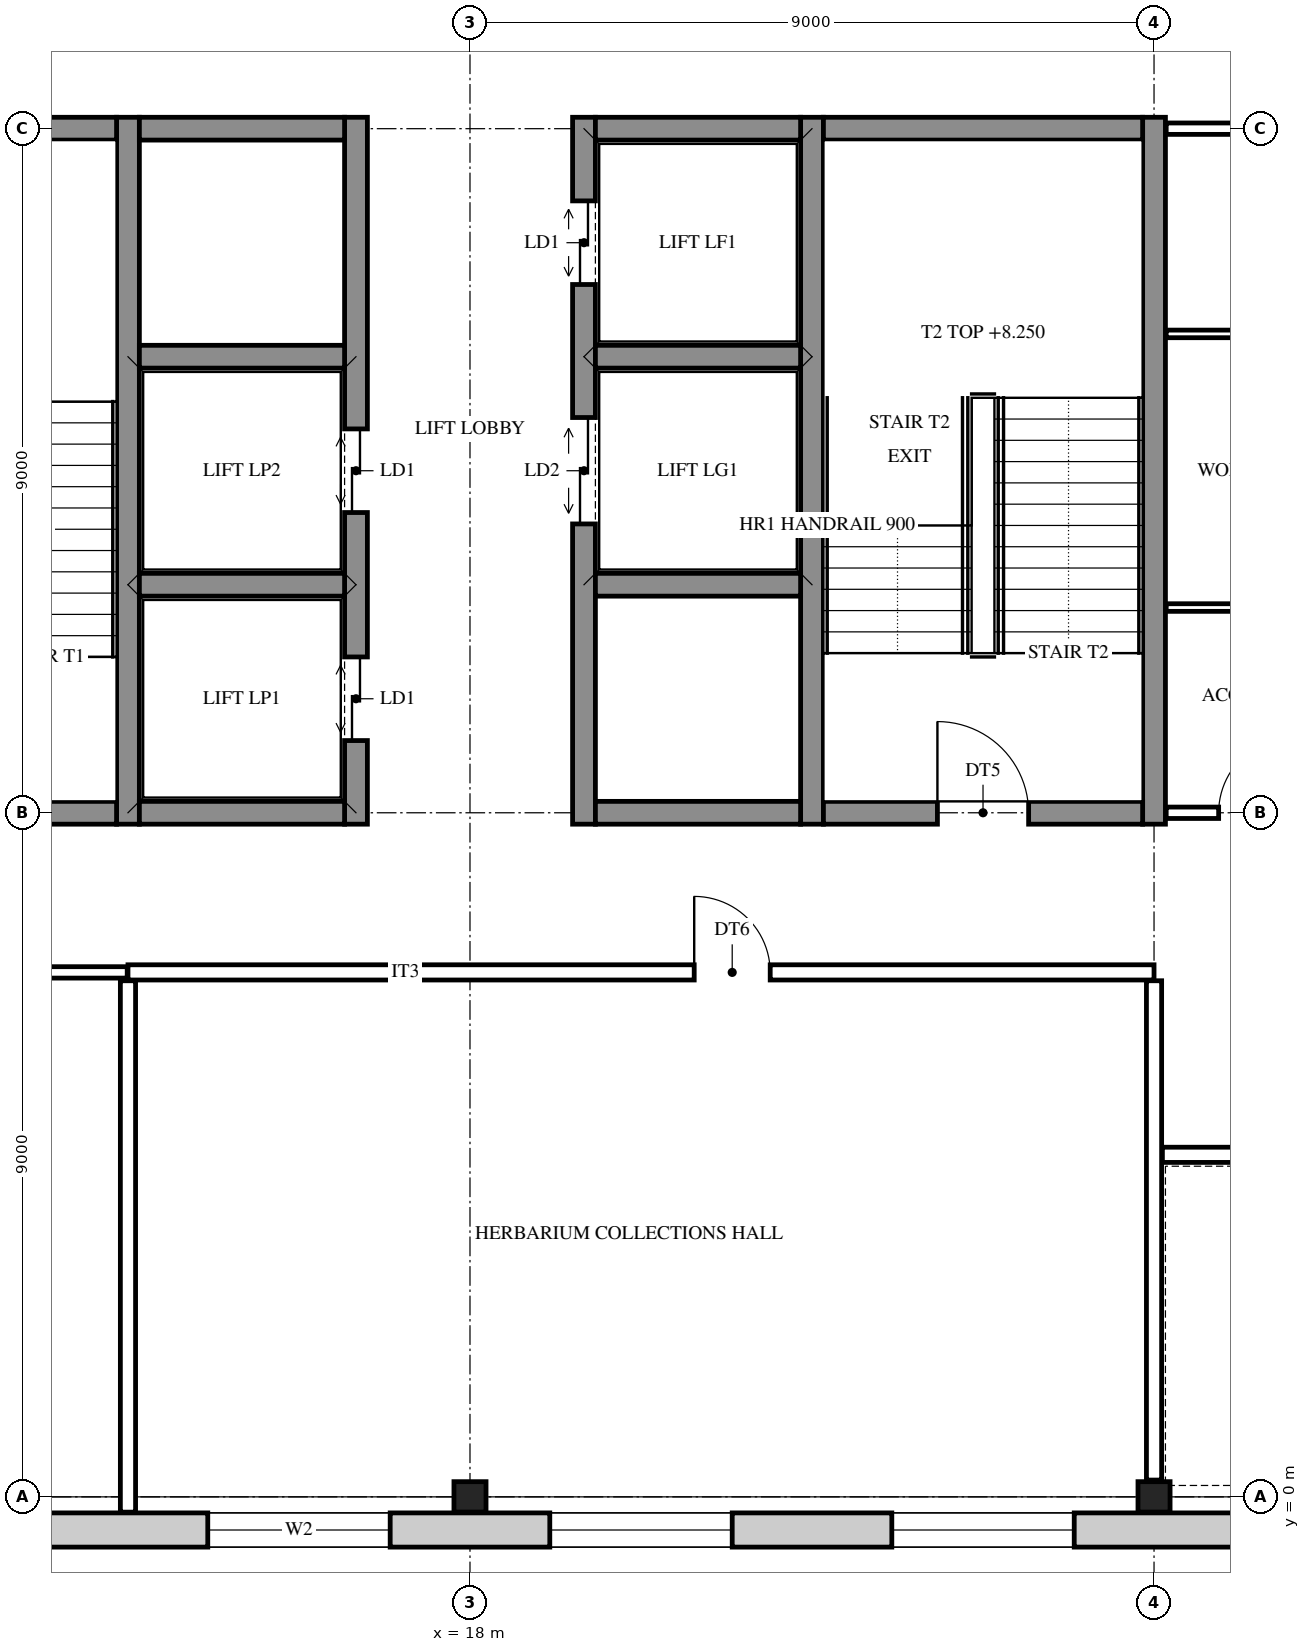
"""IFC4 building model, lengths in metres.
Left out: names, types, materials, properties, quantities, classifications, styles, units other than length and angle.
Written with IfcOpenShell. Run it as: python <this file> out.ifc"""

import sys

from ifc_helpers import new_model, si_unit, direction, frame, frame_2d, origin, origin_2d, place, context, subcontext, project, spatial, rectangle, i_section, extrude, element, fill, save


model = new_model("IFC4")
c1 = context("Model", 3, precision=1e-05, world=origin(), true_north=direction((0.0, 1.0)))
c2 = subcontext(c1, "Body", "Model", "MODEL_VIEW")
j1 = project(units=[si_unit("LENGTHUNIT", "METRE"), si_unit("PLANEANGLEUNIT", "RADIAN")], contexts=[c1])
p1 = place(None, origin())
s1 = spatial("IfcSite", under=j1, at=p1, CompositionType="ELEMENT")
p2 = place(p1, origin())
s2 = spatial("IfcBuilding", under=s1, at=p2, CompositionType="ELEMENT")
p3 = place(p2, frame((0.0, 0.0, 6.0)))
s3 = spatial("IfcBuildingStorey", under=s2, at=p3, CompositionType="ELEMENT", Elevation=6.0)
for number, where, z_axis, x_axis in (
    (1, (18.0, 0.0, 0.0), (0.0, 0.0, 1.0), (0.0, 1.0, 0.0)),
    (2, (27.0, 0.0, 0.0), (0.0, 0.0, 1.0), (0.0, 1.0, 0.0)),
):
    element("IfcColumn", number, at=place(p3, frame(where, z_axis=z_axis, x_axis=x_axis)), inside=s3, PredefinedType="COLUMN", context=c2, shape_type="SweptSolid", body=[
        extrude(i_section(OverallWidth=0.4, OverallDepth=0.422, WebThickness=0.028, FlangeThickness=0.036, at=origin_2d()), origin(), (0.0, 0.0, 1.0), 4.5),
    ])
p4 = place(p3, frame((13.5, 8.85, 0.0), z_axis=(0.0, 0.0, 1.0), x_axis=(0.0, 1.0, 0.0)))
e3 = element("IfcWall", 3, at=p4, inside=s3, PredefinedType="SHEAR", context=c2, shape_type="SweptSolid", body=[
    extrude(rectangle(XDim=9.3, YDim=0.3, at=frame_2d((4.65, 0.0))), origin(), (0.0, 0.0, 1.0), 4.5),
])
p5 = place(p3, frame((16.5, 8.85, 0.0), z_axis=(0.0, 0.0, 1.0), x_axis=(0.0, 1.0, 0.0)))
e4 = element("IfcWall", 4, at=p5, inside=s3, PredefinedType="SHEAR", context=c2, shape_type="SweptSolid", body=[
    extrude(rectangle(XDim=9.3, YDim=0.3, at=frame_2d((4.65, 0.0))), origin(), (0.0, 0.0, 1.0), 4.5),
])
p6 = place(p5, frame((1.1, 0.0, 0.0)))
e5 = element("IfcOpeningElement", 5, at=p6, cuts=e4, PredefinedType="OPENING", context=c2, shape_type="SweptSolid", body=[
    extrude(rectangle(XDim=1.1, YDim=2.1, at=frame_2d((0.55, 1.05))), frame((0.0, 0.16, 0.0), z_axis=(0.0, -1.0, 0.0), x_axis=(1.0, 0.0, 0.0)), (0.0, 0.0, 1.0), 0.32),
])
p7 = place(p5, frame((4.1, 0.0, 0.0)))
e6 = element("IfcOpeningElement", 6, at=p7, cuts=e4, PredefinedType="OPENING", context=c2, shape_type="SweptSolid", body=[
    extrude(rectangle(XDim=1.1, YDim=2.1, at=frame_2d((0.55, 1.05))), frame((0.0, 0.16, 0.0), z_axis=(0.0, -1.0, 0.0), x_axis=(1.0, 0.0, 0.0)), (0.0, 0.0, 1.0), 0.32),
])
p8 = place(p3, frame((19.5, 8.85, 0.0), z_axis=(0.0, 0.0, 1.0), x_axis=(0.0, 1.0, 0.0)))
e7 = element("IfcWall", 7, at=p8, inside=s3, PredefinedType="SHEAR", context=c2, shape_type="SweptSolid", body=[
    extrude(rectangle(XDim=9.3, YDim=0.3, at=frame_2d((4.65, 0.0))), origin(), (0.0, 0.0, 1.0), 4.5),
])
p9 = place(p8, frame((3.95, 0.0, 0.0)))
e8 = element("IfcOpeningElement", 8, at=p9, cuts=e7, PredefinedType="OPENING", context=c2, shape_type="SweptSolid", body=[
    extrude(rectangle(XDim=1.4, YDim=2.1, at=frame_2d((0.7, 1.05))), frame((0.0, 0.16, 0.0), z_axis=(0.0, -1.0, 0.0), x_axis=(1.0, 0.0, 0.0)), (0.0, 0.0, 1.0), 0.32),
])
p10 = place(p8, frame((7.1, 0.0, 0.0)))
e9 = element("IfcOpeningElement", 9, at=p10, cuts=e7, PredefinedType="OPENING", context=c2, shape_type="SweptSolid", body=[
    extrude(rectangle(XDim=1.1, YDim=2.1, at=frame_2d((0.55, 1.05))), frame((0.0, 0.16, 0.0), z_axis=(0.0, -1.0, 0.0), x_axis=(1.0, 0.0, 0.0)), (0.0, 0.0, 1.0), 0.32),
])
for number, where, z_axis, x_axis in (
    (10, (22.5, 8.85, 0.0), (0.0, 0.0, 1.0), (0.0, 1.0, 0.0)),
    (11, (27.0, 8.85, 0.0), (0.0, 0.0, 1.0), (0.0, 1.0, 0.0)),
):
    element("IfcWall", number, at=place(p3, frame(where, z_axis=z_axis, x_axis=x_axis)), inside=s3, PredefinedType="SHEAR", context=c2, shape_type="SweptSolid", body=[
        extrude(rectangle(XDim=9.3, YDim=0.3, at=frame_2d((4.65, 0.0))), origin(), (0.0, 0.0, 1.0), 4.5),
    ])
p11 = place(p3, frame((9.15, 9.0, 0.0), z_axis=(0.0, 0.0, 1.0), x_axis=(1.0, 0.0, 0.0)))
e12 = element("IfcWall", 12, at=p11, inside=s3, PredefinedType="SHEAR", context=c2, shape_type="SweptSolid", body=[
    extrude(rectangle(XDim=4.2, YDim=0.3, at=frame_2d((2.1, 0.0))), origin(), (0.0, 0.0, 1.0), 4.5),
])
p12 = place(p11, frame((1.5, 0.0, 0.0)))
e13 = element("IfcOpeningElement", 13, at=p12, cuts=e12, PredefinedType="OPENING", context=c2, shape_type="SweptSolid", body=[
    extrude(rectangle(XDim=1.2, YDim=2.1, at=frame_2d((0.6, 1.05))), frame((0.0, 0.16, 0.0), z_axis=(0.0, -1.0, 0.0), x_axis=(1.0, 0.0, 0.0)), (0.0, 0.0, 1.0), 0.32),
])
for number, where, z_axis, x_axis in (
    (14, (13.65, 9.0, 0.0), (0.0, 0.0, 1.0), (1.0, 0.0, 0.0)),
    (15, (19.65, 9.0, 0.0), (0.0, 0.0, 1.0), (1.0, 0.0, 0.0)),
):
    element("IfcWall", number, at=place(p3, frame(where, z_axis=z_axis, x_axis=x_axis)), inside=s3, PredefinedType="SHEAR", context=c2, shape_type="SweptSolid", body=[
        extrude(rectangle(XDim=2.7, YDim=0.3, at=frame_2d((1.35, 0.0))), origin(), (0.0, 0.0, 1.0), 4.5),
    ])
p13 = place(p3, frame((22.65, 9.0, 0.0), z_axis=(0.0, 0.0, 1.0), x_axis=(1.0, 0.0, 0.0)))
e16 = element("IfcWall", 16, at=p13, inside=s3, PredefinedType="SHEAR", context=c2, shape_type="SweptSolid", body=[
    extrude(rectangle(XDim=4.2, YDim=0.3, at=frame_2d((2.1, 0.0))), origin(), (0.0, 0.0, 1.0), 4.5),
])
p14 = place(p13, frame((1.5, 0.0, 0.0)))
e17 = element("IfcOpeningElement", 17, at=p14, cuts=e16, PredefinedType="OPENING", context=c2, shape_type="SweptSolid", body=[
    extrude(rectangle(XDim=1.2, YDim=2.1, at=frame_2d((0.6, 1.05))), frame((0.0, 0.16, 0.0), z_axis=(0.0, -1.0, 0.0), x_axis=(1.0, 0.0, 0.0)), (0.0, 0.0, 1.0), 0.32),
])
for number, where, z_axis, x_axis in (
    (18, (13.65, 12.0, 0.0), (0.0, 0.0, 1.0), (1.0, 0.0, 0.0)),
    (19, (19.65, 12.0, 0.0), (0.0, 0.0, 1.0), (1.0, 0.0, 0.0)),
    (20, (13.65, 15.0, 0.0), (0.0, 0.0, 1.0), (1.0, 0.0, 0.0)),
    (21, (19.65, 15.0, 0.0), (0.0, 0.0, 1.0), (1.0, 0.0, 0.0)),
):
    element("IfcWall", number, at=place(p3, frame(where, z_axis=z_axis, x_axis=x_axis)), inside=s3, PredefinedType="SHEAR", context=c2, shape_type="SweptSolid", body=[
        extrude(rectangle(XDim=2.7, YDim=0.3, at=frame_2d((1.35, 0.0))), origin(), (0.0, 0.0, 1.0), 4.5),
    ])
p15 = place(p3, frame((9.15, 18.0, 0.0), z_axis=(0.0, 0.0, 1.0), x_axis=(1.0, 0.0, 0.0)))
e22 = element("IfcWall", 22, at=p15, inside=s3, PredefinedType="SHEAR", context=c2, shape_type="SweptSolid", body=[
    extrude(rectangle(XDim=4.2, YDim=0.3, at=frame_2d((2.1, 0.0))), origin(), (0.0, 0.0, 1.0), 4.5),
])
for number, where, z_axis, x_axis in (
    (23, (13.65, 18.0, 0.0), (0.0, 0.0, 1.0), (1.0, 0.0, 0.0)),
    (24, (19.65, 18.0, 0.0), (0.0, 0.0, 1.0), (1.0, 0.0, 0.0)),
):
    element("IfcWall", number, at=place(p3, frame(where, z_axis=z_axis, x_axis=x_axis)), inside=s3, PredefinedType="SHEAR", context=c2, shape_type="SweptSolid", body=[
        extrude(rectangle(XDim=2.7, YDim=0.3, at=frame_2d((1.35, 0.0))), origin(), (0.0, 0.0, 1.0), 4.5),
    ])
p16 = place(p3, frame((22.65, 18.0, 0.0), z_axis=(0.0, 0.0, 1.0), x_axis=(1.0, 0.0, 0.0)))
e25 = element("IfcWall", 25, at=p16, inside=s3, PredefinedType="SHEAR", context=c2, shape_type="SweptSolid", body=[
    extrude(rectangle(XDim=4.2, YDim=0.3, at=frame_2d((2.1, 0.0))), origin(), (0.0, 0.0, 1.0), 4.5),
])
p17 = place(p3, frame((32.15, -0.436, 0.0), z_axis=(0.0, 0.0, 1.0), x_axis=(-1.0, 0.0, 0.0)))
e26 = element("IfcWall", 26, at=p17, inside=s3, PredefinedType="STANDARD", context=c2, shape_type="SweptSolid", body=[
    extrude(rectangle(XDim=32.8, YDim=0.45, at=frame_2d((16.4, 0.0))), origin(), (0.0, 0.0, 1.0), 4.5),
])
p18 = place(p17, frame((28.7, 0.0, 0.9)))
e27 = element("IfcOpeningElement", 27, at=p18, cuts=e26, PredefinedType="OPENING", context=c2, shape_type="SweptSolid", body=[
    extrude(rectangle(XDim=2.4, YDim=2.8, at=frame_2d((1.2, 1.4))), frame((0.0, 0.235, 0.0), z_axis=(0.0, -1.0, 0.0), x_axis=(1.0, 0.0, 0.0)), (0.0, 0.0, 1.0), 0.47),
])
p19 = place(p17, frame((24.2, 0.0, 0.9)))
e28 = element("IfcOpeningElement", 28, at=p19, cuts=e26, PredefinedType="OPENING", context=c2, shape_type="SweptSolid", body=[
    extrude(rectangle(XDim=2.4, YDim=2.8, at=frame_2d((1.2, 1.4))), frame((0.0, 0.235, 0.0), z_axis=(0.0, -1.0, 0.0), x_axis=(1.0, 0.0, 0.0)), (0.0, 0.0, 1.0), 0.47),
])
p20 = place(p17, frame((19.7, 0.0, 0.9)))
e29 = element("IfcOpeningElement", 29, at=p20, cuts=e26, PredefinedType="OPENING", context=c2, shape_type="SweptSolid", body=[
    extrude(rectangle(XDim=2.4, YDim=2.8, at=frame_2d((1.2, 1.4))), frame((0.0, 0.235, 0.0), z_axis=(0.0, -1.0, 0.0), x_axis=(1.0, 0.0, 0.0)), (0.0, 0.0, 1.0), 0.47),
])
p21 = place(p17, frame((15.2, 0.0, 0.9)))
e30 = element("IfcOpeningElement", 30, at=p21, cuts=e26, PredefinedType="OPENING", context=c2, shape_type="SweptSolid", body=[
    extrude(rectangle(XDim=2.4, YDim=2.8, at=frame_2d((1.2, 1.4))), frame((0.0, 0.235, 0.0), z_axis=(0.0, -1.0, 0.0), x_axis=(1.0, 0.0, 0.0)), (0.0, 0.0, 1.0), 0.47),
])
p22 = place(p17, frame((10.7, 0.0, 0.9)))
e31 = element("IfcOpeningElement", 31, at=p22, cuts=e26, PredefinedType="OPENING", context=c2, shape_type="SweptSolid", body=[
    extrude(rectangle(XDim=2.4, YDim=2.8, at=frame_2d((1.2, 1.4))), frame((0.0, 0.235, 0.0), z_axis=(0.0, -1.0, 0.0), x_axis=(1.0, 0.0, 0.0)), (0.0, 0.0, 1.0), 0.47),
])
p23 = place(p17, frame((6.2, 0.0, 0.9)))
e32 = element("IfcOpeningElement", 32, at=p23, cuts=e26, PredefinedType="OPENING", context=c2, shape_type="SweptSolid", body=[
    extrude(rectangle(XDim=2.4, YDim=2.8, at=frame_2d((1.2, 1.4))), frame((0.0, 0.235, 0.0), z_axis=(0.0, -1.0, 0.0), x_axis=(1.0, 0.0, 0.0)), (0.0, 0.0, 1.0), 0.47),
])
p24 = place(p17, frame((1.7, 0.0, 0.9)))
e33 = element("IfcOpeningElement", 33, at=p24, cuts=e26, PredefinedType="OPENING", context=c2, shape_type="SweptSolid", body=[
    extrude(rectangle(XDim=2.4, YDim=2.8, at=frame_2d((1.2, 1.4))), frame((0.0, 0.235, 0.0), z_axis=(0.0, -1.0, 0.0), x_axis=(1.0, 0.0, 0.0)), (0.0, 0.0, 1.0), 0.47),
])
p25 = place(p3, frame((13.5, -0.201, 0.0), z_axis=(0.0, 0.0, 1.0), x_axis=(0.0, 1.0, 0.0)))
e34 = element("IfcWall", 34, at=p25, inside=s3, PredefinedType="PARTITIONING", context=c2, shape_type="SweptSolid", body=[
    extrude(rectangle(XDim=6.991, YDim=0.2, at=frame_2d((3.496, 0.0))), origin(), (0.0, 0.0, 1.0), 3.718),
])
p26 = place(p3, frame((27.0, 0.221, 0.0), z_axis=(0.0, 0.0, 1.0), x_axis=(0.0, 1.0, 0.0)))
e35 = element("IfcWall", 35, at=p26, inside=s3, PredefinedType="PARTITIONING", context=c2, shape_type="SweptSolid", body=[
    extrude(rectangle(XDim=6.569, YDim=0.2, at=frame_2d((3.285, 0.0))), origin(), (0.0, 0.0, 1.0), 3.718),
])
p27 = place(p3, frame((27.11, 4.5, 0.0), z_axis=(0.0, 0.0, 1.0), x_axis=(1.0, 0.0, 0.0)))
e36 = element("IfcWall", 36, at=p27, inside=s3, PredefinedType="PARTITIONING", context=c2, shape_type="SweptSolid", body=[
    extrude(rectangle(XDim=4.38, YDim=0.2, at=frame_2d((2.19, 0.0))), origin(), (0.0, 0.0, 1.0), 3.718),
])
p28 = place(p27, frame((1.64, 0.0, 0.0)))
e37 = element("IfcOpeningElement", 37, at=p28, cuts=e36, PredefinedType="OPENING", context=c2, shape_type="SweptSolid", body=[
    extrude(rectangle(XDim=1.0, YDim=2.1, at=frame_2d((0.5, 1.05))), frame((0.0, 0.11, 0.0), z_axis=(0.0, -1.0, 0.0), x_axis=(1.0, 0.0, 0.0)), (0.0, 0.0, 1.0), 0.22),
])
p29 = place(p3, frame((6.985, 6.9, 0.0), z_axis=(0.0, 0.0, 1.0), x_axis=(1.0, 0.0, 0.0)))
e38 = element("IfcWall", 38, at=p29, inside=s3, PredefinedType="PARTITIONING", context=c2, shape_type="SweptSolid", body=[
    extrude(rectangle(XDim=6.505, YDim=0.15, at=frame_2d((3.252, 0.0))), origin(), (0.0, 0.0, 1.0), 3.718),
])
p30 = place(p29, frame((1.665, 0.0, 0.0)))
e39 = element("IfcOpeningElement", 39, at=p30, cuts=e38, PredefinedType="OPENING", context=c2, shape_type="SweptSolid", body=[
    extrude(rectangle(XDim=1.0, YDim=2.1, at=frame_2d((0.5, 1.05))), frame((0.0, 0.085, 0.0), z_axis=(0.0, -1.0, 0.0), x_axis=(1.0, 0.0, 0.0)), (0.0, 0.0, 1.0), 0.17),
])
p31 = place(p3, frame((13.5, 6.9, 0.0), z_axis=(0.0, 0.0, 1.0), x_axis=(1.0, 0.0, 0.0)))
e40 = element("IfcWall", 40, at=p31, inside=s3, PredefinedType="PARTITIONING", context=c2, shape_type="SweptSolid", body=[
    extrude(rectangle(XDim=13.5, YDim=0.2, at=frame_2d((6.75, 0.0))), origin(), (0.0, 0.0, 1.0), 3.718),
])
p32 = place(p31, frame((7.45, 0.0, 0.0)))
e41 = element("IfcOpeningElement", 41, at=p32, cuts=e40, PredefinedType="OPENING", context=c2, shape_type="SweptSolid", body=[
    extrude(rectangle(XDim=1.0, YDim=2.1, at=frame_2d((0.5, 1.05))), frame((0.0, 0.11, 0.0), z_axis=(0.0, -1.0, 0.0), x_axis=(1.0, 0.0, 0.0)), (0.0, 0.0, 1.0), 0.22),
])
p33 = place(p3, frame((27.16, 9.0, 0.0), z_axis=(0.0, 0.0, 1.0), x_axis=(1.0, 0.0, 0.0)))
e42 = element("IfcWall", 42, at=p33, inside=s3, PredefinedType="PARTITIONING", context=c2, shape_type="SweptSolid", body=[
    extrude(rectangle(XDim=2.455, YDim=0.15, at=frame_2d((1.228, 0.0))), origin(), (0.0, 0.0, 1.0), 3.718),
])
p34 = place(p33, frame((0.69, 0.0, 0.0)))
e43 = element("IfcOpeningElement", 43, at=p34, cuts=e42, PredefinedType="OPENING", context=c2, shape_type="SweptSolid", body=[
    extrude(rectangle(XDim=1.0, YDim=2.1, at=frame_2d((0.5, 1.05))), frame((0.0, 0.085, 0.0), z_axis=(0.0, -1.0, 0.0), x_axis=(1.0, 0.0, 0.0)), (0.0, 0.0, 1.0), 0.17),
])
for number, where, z_axis, x_axis in (
    (44, (27.16, 11.7, 0.0), (0.0, 0.0, 1.0), (1.0, 0.0, 0.0)),
    (45, (27.16, 15.3, 0.0), (0.0, 0.0, 1.0), (1.0, 0.0, 0.0)),
):
    element("IfcWall", number, at=place(p3, frame(where, z_axis=z_axis, x_axis=x_axis)), inside=s3, PredefinedType="PARTITIONING", context=c2, shape_type="SweptSolid", body=[
        extrude(rectangle(XDim=2.455, YDim=0.1, at=frame_2d((1.228, 0.0))), origin(), (0.0, 0.0, 1.0), 3.718),
    ])
p35 = place(p3, frame((27.16, 18.0, 0.0), z_axis=(0.0, 0.0, 1.0), x_axis=(1.0, 0.0, 0.0)))
e46 = element("IfcWall", 46, at=p35, inside=s3, PredefinedType="PARTITIONING", context=c2, shape_type="SweptSolid", body=[
    extrude(rectangle(XDim=4.13, YDim=0.15, at=frame_2d((2.065, 0.0))), origin(), (0.0, 0.0, 1.0), 3.718),
])
p36 = place(p21, origin())
e47 = element("IfcWindow", 47, at=p36, inside=s3, PartitioningType="SINGLE_PANEL", PredefinedType="WINDOW", context=c2, shape_type="SweptSolid", body=[
    extrude(rectangle(XDim=2.4, YDim=2.8, at=frame_2d((1.2, 1.4))), frame((0.0, 0.03, 0.0), z_axis=(0.0, -1.0, 0.0), x_axis=(1.0, 0.0, 0.0)), (0.0, 0.0, 1.0), 0.06),
])
fill(e30, e47)
p37 = place(p22, origin())
e48 = element("IfcWindow", 48, at=p37, inside=s3, PartitioningType="SINGLE_PANEL", PredefinedType="WINDOW", context=c2, shape_type="SweptSolid", body=[
    extrude(rectangle(XDim=2.4, YDim=2.8, at=frame_2d((1.2, 1.4))), frame((0.0, 0.03, 0.0), z_axis=(0.0, -1.0, 0.0), x_axis=(1.0, 0.0, 0.0)), (0.0, 0.0, 1.0), 0.06),
])
fill(e31, e48)
p38 = place(p23, origin())
e49 = element("IfcWindow", 49, at=p38, inside=s3, PartitioningType="SINGLE_PANEL", PredefinedType="WINDOW", context=c2, shape_type="SweptSolid", body=[
    extrude(rectangle(XDim=2.4, YDim=2.8, at=frame_2d((1.2, 1.4))), frame((0.0, 0.03, 0.0), z_axis=(0.0, -1.0, 0.0), x_axis=(1.0, 0.0, 0.0)), (0.0, 0.0, 1.0), 0.06),
])
fill(e32, e49)
p39 = place(p14, origin())
e50 = element("IfcDoor", 50, at=p39, inside=s3, OperationType="SINGLE_SWING_LEFT", PredefinedType="DOOR", context=c2, shape_type="SweptSolid", body=[
    extrude(rectangle(XDim=1.2, YDim=2.1, at=frame_2d((0.6, 1.05))), frame((0.0, 0.025, 0.0), z_axis=(0.0, -1.0, 0.0), x_axis=(1.0, 0.0, 0.0)), (0.0, 0.0, 1.0), 0.05),
])
fill(e17, e50)
p40 = place(p34, origin())
e51 = element("IfcDoor", 51, at=p40, inside=s3, OperationType="SINGLE_SWING_RIGHT", PredefinedType="DOOR", context=c2, shape_type="SweptSolid", body=[
    extrude(rectangle(XDim=1.0, YDim=2.1, at=frame_2d((0.5, 1.05))), frame((0.0, 0.025, 0.0), z_axis=(0.0, -1.0, 0.0), x_axis=(1.0, 0.0, 0.0)), (0.0, 0.0, 1.0), 0.05),
])
fill(e43, e51)
p41 = place(p32, frame((1.0, 0.0, 0.0), z_axis=(0.0, 0.0, 1.0), x_axis=(-1.0, 0.0, 0.0)))
e52 = element("IfcDoor", 52, at=p41, inside=s3, OperationType="SINGLE_SWING_LEFT", PredefinedType="DOOR", context=c2, shape_type="SweptSolid", body=[
    extrude(rectangle(XDim=1.0, YDim=2.1, at=frame_2d((0.5, 1.05))), frame((0.0, 0.025, 0.0), z_axis=(0.0, -1.0, 0.0), x_axis=(1.0, 0.0, 0.0)), (0.0, 0.0, 1.0), 0.05),
])
fill(e41, e52)
p42 = place(p6, origin())
e53 = element("IfcDoor", 53, at=p42, inside=s3, OperationType="DOUBLE_DOOR_SLIDING", PredefinedType="DOOR", context=c2, shape_type="SweptSolid", body=[
    extrude(rectangle(XDim=1.1, YDim=2.1, at=frame_2d((0.55, 1.05))), frame((0.0, 0.025, 0.0), z_axis=(0.0, -1.0, 0.0), x_axis=(1.0, 0.0, 0.0)), (0.0, 0.0, 1.0), 0.05),
])
fill(e5, e53)
p43 = place(p7, origin())
e54 = element("IfcDoor", 54, at=p43, inside=s3, OperationType="DOUBLE_DOOR_SLIDING", PredefinedType="DOOR", context=c2, shape_type="SweptSolid", body=[
    extrude(rectangle(XDim=1.1, YDim=2.1, at=frame_2d((0.55, 1.05))), frame((0.0, 0.025, 0.0), z_axis=(0.0, -1.0, 0.0), x_axis=(1.0, 0.0, 0.0)), (0.0, 0.0, 1.0), 0.05),
])
fill(e6, e54)
p44 = place(p9, origin())
e55 = element("IfcDoor", 55, at=p44, inside=s3, OperationType="DOUBLE_DOOR_SLIDING", PredefinedType="DOOR", context=c2, shape_type="SweptSolid", body=[
    extrude(rectangle(XDim=1.4, YDim=2.1, at=frame_2d((0.7, 1.05))), frame((0.0, 0.025, 0.0), z_axis=(0.0, -1.0, 0.0), x_axis=(1.0, 0.0, 0.0)), (0.0, 0.0, 1.0), 0.05),
])
fill(e8, e55)
p45 = place(p10, origin())
e56 = element("IfcDoor", 56, at=p45, inside=s3, OperationType="DOUBLE_DOOR_SLIDING", PredefinedType="DOOR", context=c2, shape_type="SweptSolid", body=[
    extrude(rectangle(XDim=1.1, YDim=2.1, at=frame_2d((0.55, 1.05))), frame((0.0, 0.025, 0.0), z_axis=(0.0, -1.0, 0.0), x_axis=(1.0, 0.0, 0.0)), (0.0, 0.0, 1.0), 0.05),
])
fill(e9, e56)
save(model, sys.argv[1])
